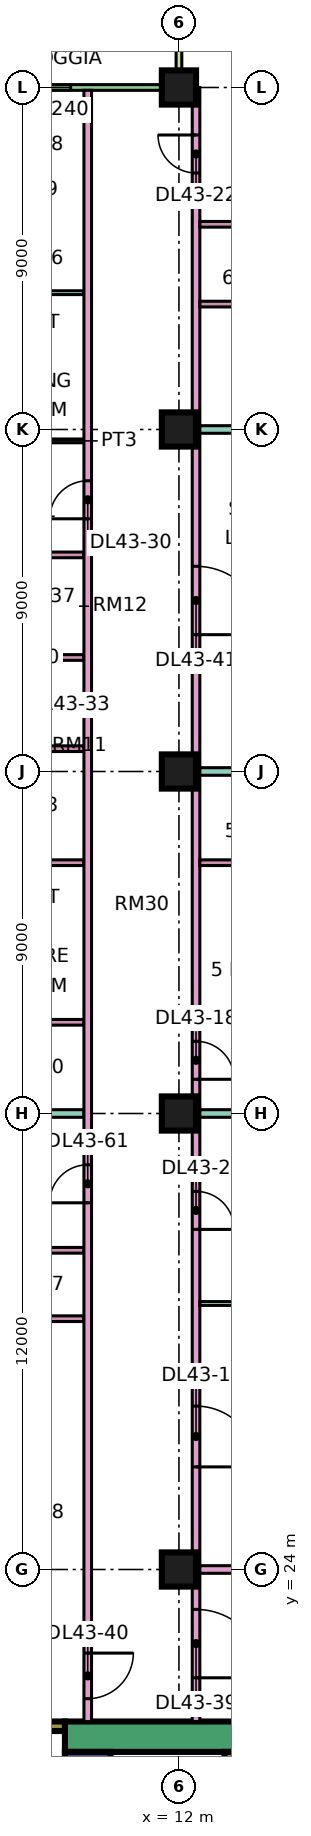
"""IFC4 building model, lengths in metres.
Left out: names, types, materials, properties, quantities, classifications, styles, units other than length and angle.
Written with IfcOpenShell. Run it as: python <this file> out.ifc"""

import sys

from ifc_helpers import new_model, si_unit, direction, frame, frame_2d, origin, origin_2d, place, context, subcontext, project, spatial, rectangle, extrude, element, fill, save


model = new_model("IFC4")
c1 = context("Model", 3, precision=1e-05, world=origin(), true_north=direction((0.0, 1.0)))
c2 = subcontext(c1, "Body", "Model", "MODEL_VIEW")
j1 = project(units=[si_unit("LENGTHUNIT", "METRE"), si_unit("PLANEANGLEUNIT", "RADIAN")], contexts=[c1])
p1 = place(None, origin())
s1 = spatial("IfcSite", under=j1, at=p1, CompositionType="ELEMENT")
p2 = place(p1, origin())
s2 = spatial("IfcBuilding", under=s1, at=p2, CompositionType="ELEMENT")
p3 = place(p2, frame((0.0, 0.0, 187.4)))
s3 = spatial("IfcBuildingStorey", under=s2, at=p3, CompositionType="ELEMENT", Elevation=187.4)
for number, where, z_axis, x_axis in (
    (1, (12.0, 24.0, 0.0), (0.0, 0.0, 1.0), (1.0, 0.0, 0.0)),
    (2, (12.0, 36.0, 0.0), (0.0, 0.0, 1.0), (1.0, 0.0, 0.0)),
    (3, (12.0, 45.0, 0.0), (0.0, 0.0, 1.0), (1.0, 0.0, 0.0)),
    (4, (12.0, 54.0, 0.0), (0.0, 0.0, 1.0), (1.0, 0.0, 0.0)),
    (5, (12.0, 63.0, 0.0), (0.0, 0.0, 1.0), (1.0, 0.0, 0.0)),
):
    element("IfcColumn", number, at=place(p3, frame(where, z_axis=z_axis, x_axis=x_axis)), inside=s3, PredefinedType="COLUMN", context=c2, shape_type="SweptSolid", body=[
        extrude(rectangle(XDim=0.9, YDim=0.9, at=origin_2d()), origin(), (0.0, 0.0, 1.0), 3.75),
    ])
p4 = place(p3, frame((9.0, 19.6, 0.0), z_axis=(0.0, 0.0, 1.0), x_axis=(1.0, 0.0, 0.0)))
e6 = element("IfcWall", 6, at=p4, inside=s3, PredefinedType="SHEAR", context=c2, shape_type="SweptSolid", body=[
    extrude(rectangle(XDim=25.0, YDim=0.8, at=frame_2d((12.5, 0.0))), origin(), (0.0, 0.0, 1.0), 3.75),
])
p5 = place(p4, frame((19.1, 0.0, 0.0)))
e7 = element("IfcOpeningElement", 7, at=p5, cuts=e6, PredefinedType="OPENING", context=c2, shape_type="SweptSolid", body=[
    extrude(rectangle(XDim=1.8, YDim=2.4, at=frame_2d((0.9, 1.2))), frame((0.0, 0.41, 0.0), z_axis=(0.0, -1.0, 0.0), x_axis=(1.0, 0.0, 0.0)), (0.0, 0.0, 1.0), 0.82),
])
p6 = place(p3, frame((9.6, 7.8, 0.0), z_axis=(0.0, 0.0, 1.0), x_axis=(0.0, 1.0, 0.0)))
e8 = element("IfcWall", 8, at=p6, inside=s3, PredefinedType="SHEAR", context=c2, shape_type="SweptSolid", body=[
    extrude(rectangle(XDim=11.4, YDim=1.2, at=frame_2d((5.7, 0.0))), origin(), (0.0, 0.0, 1.0), 3.75),
])
p7 = place(p6, frame((4.075, 0.0, 0.0)))
e9 = element("IfcOpeningElement", 9, at=p7, cuts=e8, PredefinedType="OPENING", context=c2, shape_type="SweptSolid", body=[
    extrude(rectangle(XDim=1.1, YDim=2.2, at=frame_2d((0.55, 1.1))), frame((0.0, 0.61, 0.0), z_axis=(0.0, -1.0, 0.0), x_axis=(1.0, 0.0, 0.0)), (0.0, 0.0, 1.0), 1.22),
])
p8 = place(p6, frame((6.575, 0.0, 0.0)))
e10 = element("IfcOpeningElement", 10, at=p8, cuts=e8, PredefinedType="OPENING", context=c2, shape_type="SweptSolid", body=[
    extrude(rectangle(XDim=1.1, YDim=2.2, at=frame_2d((0.55, 1.1))), frame((0.0, 0.61, 0.0), z_axis=(0.0, -1.0, 0.0), x_axis=(1.0, 0.0, 0.0)), (0.0, 0.0, 1.0), 1.22),
])
p9 = place(p6, frame((9.4, 0.0, 0.0)))
e11 = element("IfcOpeningElement", 11, at=p9, cuts=e8, PredefinedType="OPENING", context=c2, shape_type="SweptSolid", body=[
    extrude(rectangle(XDim=1.1, YDim=2.2, at=frame_2d((0.55, 1.1))), frame((0.0, 0.61, 0.0), z_axis=(0.0, -1.0, 0.0), x_axis=(1.0, 0.0, 0.0)), (0.0, 0.0, 1.0), 1.22),
])
p10 = place(p6, frame((1.75, 0.0, 0.0)))
e12 = element("IfcOpeningElement", 12, at=p10, cuts=e8, PredefinedType="OPENING", context=c2, shape_type="SweptSolid", body=[
    extrude(rectangle(XDim=0.9, YDim=2.1, at=frame_2d((0.45, 1.05))), frame((0.0, 0.61, 0.0), z_axis=(0.0, -1.0, 0.0), x_axis=(1.0, 0.0, 0.0)), (0.0, 0.0, 1.0), 1.22),
])
p11 = place(p3, frame((13.325, 7.8, 0.0), z_axis=(0.0, 0.0, 1.0), x_axis=(0.0, 1.0, 0.0)))
e13 = element("IfcWall", 13, at=p11, inside=s3, PredefinedType="SHEAR", context=c2, shape_type="SweptSolid", body=[
    extrude(rectangle(XDim=11.4, YDim=0.25, at=frame_2d((5.7, 0.0))), origin(), (0.0, 0.0, 1.0), 3.75),
])
p12 = place(p3, frame((2.1, 19.875, 0.0), z_axis=(0.0, 0.0, 1.0), x_axis=(1.0, 0.0, 0.0)))
e14 = element("IfcWall", 14, at=p12, inside=s3, PredefinedType="SHEAR", context=c2, shape_type="SweptSolid", body=[
    extrude(rectangle(XDim=6.9, YDim=0.25, at=frame_2d((3.45, 0.0))), origin(), (0.0, 0.0, 1.0), 3.75),
])
p13 = place(p12, frame((1.175, 0.0, 0.0)))
e15 = element("IfcOpeningElement", 15, at=p13, cuts=e14, PredefinedType="OPENING", context=c2, shape_type="SweptSolid", body=[
    extrude(rectangle(XDim=1.1, YDim=2.2, at=frame_2d((0.55, 1.1))), frame((0.0, 0.135, 0.0), z_axis=(0.0, -1.0, 0.0), x_axis=(1.0, 0.0, 0.0)), (0.0, 0.0, 1.0), 0.27),
])
p14 = place(p12, frame((4.6, 0.0, 0.0)))
e16 = element("IfcOpeningElement", 16, at=p14, cuts=e14, PredefinedType="OPENING", context=c2, shape_type="SweptSolid", body=[
    extrude(rectangle(XDim=1.2, YDim=2.2, at=frame_2d((0.6, 1.1))), frame((0.0, 0.135, 0.0), z_axis=(0.0, -1.0, 0.0), x_axis=(1.0, 0.0, 0.0)), (0.0, 0.0, 1.0), 0.27),
])
p15 = place(p3, frame((11.925, 63.0, 0.0), z_axis=(0.0, 0.0, 1.0), x_axis=(-1.0, 0.0, 0.0)))
e17 = element("IfcWall", 17, at=p15, inside=s3, PredefinedType="SOLIDWALL", context=c2, shape_type="SweptSolid", body=[
    extrude(rectangle(XDim=10.35, YDim=0.15, at=frame_2d((5.175, 0.0))), origin(), (0.0, 0.0, 1.0), 3.35),
])
p16 = place(p15, frame((2.775, 0.0, 0.45)))
e18 = element("IfcOpeningElement", 18, at=p16, cuts=e17, PredefinedType="OPENING", context=c2, shape_type="SweptSolid", body=[
    extrude(rectangle(XDim=1.8, YDim=2.4, at=frame_2d((0.9, 1.2))), frame((0.0, 0.085, 0.0), z_axis=(0.0, -1.0, 0.0), x_axis=(1.0, 0.0, 0.0)), (0.0, 0.0, 1.0), 0.17),
])
p17 = place(p15, frame((7.387, 0.0, 0.0)))
e19 = element("IfcOpeningElement", 19, at=p17, cuts=e17, PredefinedType="OPENING", context=c2, shape_type="SweptSolid", body=[
    extrude(rectangle(XDim=1.8, YDim=2.4, at=frame_2d((0.9, 1.2))), frame((0.0, 0.085, 0.0), z_axis=(0.0, -1.0, 0.0), x_axis=(1.0, 0.0, 0.0)), (0.0, 0.0, 1.0), 0.17),
])
p18 = place(p3, frame((12.0, 64.5, 0.0), z_axis=(0.0, 0.0, 1.0), x_axis=(0.0, -1.0, 0.0)))
e20 = element("IfcWall", 20, at=p18, inside=s3, PredefinedType="SOLIDWALL", context=c2, shape_type="SweptSolid", body=[
    extrude(rectangle(XDim=1.5, YDim=0.15, at=frame_2d((0.75, 0.0))), origin(), (0.0, 0.0, 1.0), 3.35),
])
p19 = place(p3, frame((-1.35, 22.4, 0.0), z_axis=(0.0, 0.0, 1.0), x_axis=(1.0, 0.0, 0.0)))
e21 = element("IfcWall", 21, at=p19, inside=s3, PredefinedType="PARTITIONING", context=c2, shape_type="SweptSolid", body=[
    extrude(rectangle(XDim=10.85, YDim=0.2, at=frame_2d((5.425, 0.0))), origin(), (0.0, 0.0, 1.0), 3.35),
])
p20 = place(p3, frame((0.0, 36.0, 0.0), z_axis=(0.0, 0.0, 1.0), x_axis=(1.0, 0.0, 0.0)))
e22 = element("IfcWall", 22, at=p20, inside=s3, PredefinedType="PARTITIONING", context=c2, shape_type="SweptSolid", body=[
    extrude(rectangle(XDim=9.5, YDim=0.2, at=frame_2d((4.75, 0.0))), origin(), (0.0, 0.0, 1.0), 3.35),
])
for number, where, z_axis, x_axis in (
    (23, (6.95, 53.7, 0.0), (0.0, 0.0, 1.0), (1.0, 0.0, 0.0)),
    (24, (6.95, 57.6, 0.0), (0.0, 0.0, 1.0), (1.0, 0.0, 0.0)),
):
    element("IfcWall", number, at=place(p3, frame(where, z_axis=z_axis, x_axis=x_axis)), inside=s3, PredefinedType="PARTITIONING", context=c2, shape_type="SweptSolid", body=[
        extrude(rectangle(XDim=2.55, YDim=0.1, at=frame_2d((1.275, 0.0))), origin(), (0.0, 0.0, 1.0), 3.35),
    ])
for number, where, z_axis, x_axis in (
    (25, (6.975, 30.6, 0.0), (0.0, 0.0, 1.0), (1.0, 0.0, 0.0)),
    (26, (6.975, 32.4, 0.0), (0.0, 0.0, 1.0), (1.0, 0.0, 0.0)),
    (27, (6.975, 38.4, 0.0), (0.0, 0.0, 1.0), (1.0, 0.0, 0.0)),
    (28, (6.975, 42.6, 0.0), (0.0, 0.0, 1.0), (1.0, 0.0, 0.0)),
    (29, (6.975, 45.6, 0.0), (0.0, 0.0, 1.0), (1.0, 0.0, 0.0)),
    (30, (6.975, 48.0, 0.0), (0.0, 0.0, 1.0), (1.0, 0.0, 0.0)),
):
    element("IfcWall", number, at=place(p3, frame(where, z_axis=z_axis, x_axis=x_axis)), inside=s3, PredefinedType="PARTITIONING", context=c2, shape_type="SweptSolid", body=[
        extrude(rectangle(XDim=2.525, YDim=0.15, at=frame_2d((1.262, 0.0))), origin(), (0.0, 0.0, 1.0), 3.35),
    ])
p21 = place(p3, frame((6.975, 50.7, 0.0), z_axis=(0.0, 0.0, 1.0), x_axis=(1.0, 0.0, 0.0)))
e31 = element("IfcWall", 31, at=p21, inside=s3, PredefinedType="PARTITIONING", context=c2, shape_type="SweptSolid", body=[
    extrude(rectangle(XDim=2.525, YDim=0.15, at=frame_2d((1.262, 0.0))), origin(), (0.0, 0.0, 1.0), 3.35),
])
p22 = place(p21, frame((0.825, 0.0, 0.0)))
e32 = element("IfcOpeningElement", 32, at=p22, cuts=e31, PredefinedType="OPENING", context=c2, shape_type="SweptSolid", body=[
    extrude(rectangle(XDim=0.8, YDim=2.1, at=frame_2d((0.4, 1.05))), frame((0.0, 0.085, 0.0), z_axis=(0.0, -1.0, 0.0), x_axis=(1.0, 0.0, 0.0)), (0.0, 0.0, 1.0), 0.17),
])
p23 = place(p3, frame((9.6, 20.0, 0.0), z_axis=(0.0, 0.0, 1.0), x_axis=(0.0, 1.0, 0.0)))
e33 = element("IfcWall", 33, at=p23, inside=s3, PredefinedType="PARTITIONING", context=c2, shape_type="SweptSolid", body=[
    extrude(rectangle(XDim=42.926, YDim=0.2, at=frame_2d((21.463, 0.0))), origin(), (0.0, 0.0, 1.0), 3.35),
])
p24 = place(p23, frame((31.65, 0.0, 0.0)))
e34 = element("IfcOpeningElement", 34, at=p24, cuts=e33, PredefinedType="OPENING", context=c2, shape_type="SweptSolid", body=[
    extrude(rectangle(XDim=1.0, YDim=2.1, at=frame_2d((0.5, 1.05))), frame((0.0, 0.11, 0.0), z_axis=(0.0, -1.0, 0.0), x_axis=(1.0, 0.0, 0.0)), (0.0, 0.0, 1.0), 0.22),
])
p25 = place(p23, frame((0.6, 0.0, 0.0)))
e35 = element("IfcOpeningElement", 35, at=p25, cuts=e33, PredefinedType="OPENING", context=c2, shape_type="SweptSolid", body=[
    extrude(rectangle(XDim=1.2, YDim=2.1, at=frame_2d((0.6, 1.05))), frame((0.0, 0.11, 0.0), z_axis=(0.0, -1.0, 0.0), x_axis=(1.0, 0.0, 0.0)), (0.0, 0.0, 1.0), 0.22),
])
p26 = place(p23, frame((13.65, 0.0, 0.0)))
e36 = element("IfcOpeningElement", 36, at=p26, cuts=e33, PredefinedType="OPENING", context=c2, shape_type="SweptSolid", body=[
    extrude(rectangle(XDim=1.0, YDim=2.1, at=frame_2d((0.5, 1.05))), frame((0.0, 0.11, 0.0), z_axis=(0.0, -1.0, 0.0), x_axis=(1.0, 0.0, 0.0)), (0.0, 0.0, 1.0), 0.22),
])
p27 = place(p3, frame((12.45, 20.0, 0.0), z_axis=(0.0, 0.0, 1.0), x_axis=(0.0, 1.0, 0.0)))
e37 = element("IfcWall", 37, at=p27, inside=s3, PredefinedType="PARTITIONING", context=c2, shape_type="SweptSolid", body=[
    extrude(rectangle(XDim=43.0, YDim=0.2, at=frame_2d((21.5, 0.0))), origin(), (0.0, 0.0, 1.0), 3.35),
])
p28 = place(p27, frame((6.7, 0.0, 0.0)))
e38 = element("IfcOpeningElement", 38, at=p28, cuts=e37, PredefinedType="OPENING", context=c2, shape_type="SweptSolid", body=[
    extrude(rectangle(XDim=1.6, YDim=2.1, at=frame_2d((0.8, 1.05))), frame((0.0, 0.11, 0.0), z_axis=(0.0, -1.0, 0.0), x_axis=(1.0, 0.0, 0.0)), (0.0, 0.0, 1.0), 0.22),
])
p29 = place(p27, frame((12.95, 0.0, 0.0)))
e39 = element("IfcOpeningElement", 39, at=p29, cuts=e37, PredefinedType="OPENING", context=c2, shape_type="SweptSolid", body=[
    extrude(rectangle(XDim=1.0, YDim=2.1, at=frame_2d((0.5, 1.05))), frame((0.0, 0.11, 0.0), z_axis=(0.0, -1.0, 0.0), x_axis=(1.0, 0.0, 0.0)), (0.0, 0.0, 1.0), 0.22),
])
p30 = place(p27, frame((16.9, 0.0, 0.0)))
e40 = element("IfcOpeningElement", 40, at=p30, cuts=e37, PredefinedType="OPENING", context=c2, shape_type="SweptSolid", body=[
    extrude(rectangle(XDim=1.0, YDim=2.1, at=frame_2d((0.5, 1.05))), frame((0.0, 0.11, 0.0), z_axis=(0.0, -1.0, 0.0), x_axis=(1.0, 0.0, 0.0)), (0.0, 0.0, 1.0), 0.22),
])
p31 = place(p27, frame((40.75, 0.0, 0.0)))
e41 = element("IfcOpeningElement", 41, at=p31, cuts=e37, PredefinedType="OPENING", context=c2, shape_type="SweptSolid", body=[
    extrude(rectangle(XDim=1.0, YDim=2.1, at=frame_2d((0.5, 1.05))), frame((0.0, 0.11, 0.0), z_axis=(0.0, -1.0, 0.0), x_axis=(1.0, 0.0, 0.0)), (0.0, 0.0, 1.0), 0.22),
])
p32 = place(p27, frame((1.15, 0.0, 0.0)))
e42 = element("IfcOpeningElement", 42, at=p32, cuts=e37, PredefinedType="OPENING", context=c2, shape_type="SweptSolid", body=[
    extrude(rectangle(XDim=1.8, YDim=2.1, at=frame_2d((0.9, 1.05))), frame((0.0, 0.11, 0.0), z_axis=(0.0, -1.0, 0.0), x_axis=(1.0, 0.0, 0.0)), (0.0, 0.0, 1.0), 0.22),
])
p33 = place(p27, frame((28.6, 0.0, 0.0)))
e43 = element("IfcOpeningElement", 43, at=p33, cuts=e37, PredefinedType="OPENING", context=c2, shape_type="SweptSolid", body=[
    extrude(rectangle(XDim=1.8, YDim=2.1, at=frame_2d((0.9, 1.05))), frame((0.0, 0.11, 0.0), z_axis=(0.0, -1.0, 0.0), x_axis=(1.0, 0.0, 0.0)), (0.0, 0.0, 1.0), 0.22),
])
p34 = place(p3, frame((12.55, 24.0, 0.0), z_axis=(0.0, 0.0, 1.0), x_axis=(1.0, 0.0, 0.0)))
e44 = element("IfcWall", 44, at=p34, inside=s3, PredefinedType="PARTITIONING", context=c2, shape_type="SweptSolid", body=[
    extrude(rectangle(XDim=8.95, YDim=0.2, at=frame_2d((4.475, 0.0))), origin(), (0.0, 0.0, 1.0), 3.35),
])
p35 = place(p3, frame((12.55, 31.0, 0.0), z_axis=(0.0, 0.0, 1.0), x_axis=(1.0, 0.0, 0.0)))
e45 = element("IfcWall", 45, at=p35, inside=s3, PredefinedType="PARTITIONING", context=c2, shape_type="SweptSolid", body=[
    extrude(rectangle(XDim=8.95, YDim=0.1, at=frame_2d((4.475, 0.0))), origin(), (0.0, 0.0, 1.0), 3.35),
])
p36 = place(p3, frame((12.55, 36.0, 0.0), z_axis=(0.0, 0.0, 1.0), x_axis=(1.0, 0.0, 0.0)))
e46 = element("IfcWall", 46, at=p36, inside=s3, PredefinedType="PARTITIONING", context=c2, shape_type="SweptSolid", body=[
    extrude(rectangle(XDim=11.45, YDim=0.2, at=frame_2d((5.725, 0.0))), origin(), (0.0, 0.0, 1.0), 3.35),
])
for number, where, z_axis, x_axis in (
    (47, (12.55, 38.7, 0.0), (0.0, 0.0, 1.0), (1.0, 0.0, 0.0)),
    (48, (12.55, 42.6, 0.0), (0.0, 0.0, 1.0), (1.0, 0.0, 0.0)),
):
    element("IfcWall", number, at=place(p3, frame(where, z_axis=z_axis, x_axis=x_axis)), inside=s3, PredefinedType="PARTITIONING", context=c2, shape_type="SweptSolid", body=[
        extrude(rectangle(XDim=4.025, YDim=0.15, at=frame_2d((2.012, 0.0))), origin(), (0.0, 0.0, 1.0), 3.35),
    ])
p37 = place(p3, frame((12.55, 45.0, 0.0), z_axis=(0.0, 0.0, 1.0), x_axis=(1.0, 0.0, 0.0)))
e49 = element("IfcWall", 49, at=p37, inside=s3, PredefinedType="PARTITIONING", context=c2, shape_type="SweptSolid", body=[
    extrude(rectangle(XDim=11.45, YDim=0.2, at=frame_2d((5.725, 0.0))), origin(), (0.0, 0.0, 1.0), 3.35),
])
p38 = place(p3, frame((12.55, 54.0, 0.0), z_axis=(0.0, 0.0, 1.0), x_axis=(1.0, 0.0, 0.0)))
e50 = element("IfcWall", 50, at=p38, inside=s3, PredefinedType="PARTITIONING", context=c2, shape_type="SweptSolid", body=[
    extrude(rectangle(XDim=11.376, YDim=0.2, at=frame_2d((5.688, 0.0))), origin(), (0.0, 0.0, 1.0), 3.35),
])
for number, where, z_axis, x_axis in (
    (51, (12.55, 57.3, 0.0), (0.0, 0.0, 1.0), (1.0, 0.0, 0.0)),
    (52, (12.55, 59.4, 0.0), (0.0, 0.0, 1.0), (1.0, 0.0, 0.0)),
):
    element("IfcWall", number, at=place(p3, frame(where, z_axis=z_axis, x_axis=x_axis)), inside=s3, PredefinedType="PARTITIONING", context=c2, shape_type="SweptSolid", body=[
        extrude(rectangle(XDim=4.625, YDim=0.15, at=frame_2d((2.312, 0.0))), origin(), (0.0, 0.0, 1.0), 3.35),
    ])
p39 = place(p16, origin())
e53 = element("IfcWindow", 53, at=p39, inside=s3, PartitioningType="SINGLE_PANEL", PredefinedType="WINDOW", context=c2, shape_type="SweptSolid", body=[
    extrude(rectangle(XDim=1.8, YDim=2.4, at=frame_2d((0.9, 1.2))), frame((0.0, 0.03, 0.0), z_axis=(0.0, -1.0, 0.0), x_axis=(1.0, 0.0, 0.0)), (0.0, 0.0, 1.0), 0.06),
])
fill(e18, e53)
p40 = place(p28, frame((1.6, 0.0, 0.0), z_axis=(0.0, 0.0, 1.0), x_axis=(-1.0, 0.0, 0.0)))
e54 = element("IfcDoor", 54, at=p40, inside=s3, OperationType="DOUBLE_DOOR_SINGLE_SWING", PredefinedType="DOOR", context=c2, shape_type="SweptSolid", body=[
    extrude(rectangle(XDim=1.6, YDim=2.1, at=frame_2d((0.8, 1.05))), frame((0.0, 0.025, 0.0), z_axis=(0.0, -1.0, 0.0), x_axis=(1.0, 0.0, 0.0)), (0.0, 0.0, 1.0), 0.05),
])
fill(e38, e54)
p41 = place(p29, frame((1.0, 0.0, 0.0), z_axis=(0.0, 0.0, 1.0), x_axis=(-1.0, 0.0, 0.0)))
e55 = element("IfcDoor", 55, at=p41, inside=s3, OperationType="SINGLE_SWING_LEFT", PredefinedType="DOOR", context=c2, shape_type="SweptSolid", body=[
    extrude(rectangle(XDim=1.0, YDim=2.1, at=frame_2d((0.5, 1.05))), frame((0.0, 0.025, 0.0), z_axis=(0.0, -1.0, 0.0), x_axis=(1.0, 0.0, 0.0)), (0.0, 0.0, 1.0), 0.05),
])
fill(e39, e55)
p42 = place(p30, frame((1.0, 0.0, 0.0), z_axis=(0.0, 0.0, 1.0), x_axis=(-1.0, 0.0, 0.0)))
e56 = element("IfcDoor", 56, at=p42, inside=s3, OperationType="SINGLE_SWING_LEFT", PredefinedType="DOOR", context=c2, shape_type="SweptSolid", body=[
    extrude(rectangle(XDim=1.0, YDim=2.1, at=frame_2d((0.5, 1.05))), frame((0.0, 0.025, 0.0), z_axis=(0.0, -1.0, 0.0), x_axis=(1.0, 0.0, 0.0)), (0.0, 0.0, 1.0), 0.05),
])
fill(e40, e56)
p43 = place(p31, frame((1.0, 0.0, 0.0), z_axis=(0.0, 0.0, 1.0), x_axis=(-1.0, 0.0, 0.0)))
e57 = element("IfcDoor", 57, at=p43, inside=s3, OperationType="SINGLE_SWING_RIGHT", PredefinedType="DOOR", context=c2, shape_type="SweptSolid", body=[
    extrude(rectangle(XDim=1.0, YDim=2.1, at=frame_2d((0.5, 1.05))), frame((0.0, 0.025, 0.0), z_axis=(0.0, -1.0, 0.0), x_axis=(1.0, 0.0, 0.0)), (0.0, 0.0, 1.0), 0.05),
])
fill(e41, e57)
p44 = place(p24, origin())
e58 = element("IfcDoor", 58, at=p44, inside=s3, OperationType="SINGLE_SWING_LEFT", PredefinedType="DOOR", context=c2, shape_type="SweptSolid", body=[
    extrude(rectangle(XDim=1.0, YDim=2.1, at=frame_2d((0.5, 1.05))), frame((0.0, 0.025, 0.0), z_axis=(0.0, -1.0, 0.0), x_axis=(1.0, 0.0, 0.0)), (0.0, 0.0, 1.0), 0.05),
])
fill(e34, e58)
p45 = place(p32, frame((1.8, 0.0, 0.0), z_axis=(0.0, 0.0, 1.0), x_axis=(-1.0, 0.0, 0.0)))
e59 = element("IfcDoor", 59, at=p45, inside=s3, OperationType="DOUBLE_DOOR_SINGLE_SWING", PredefinedType="DOOR", context=c2, shape_type="SweptSolid", body=[
    extrude(rectangle(XDim=1.8, YDim=2.1, at=frame_2d((0.9, 1.05))), frame((0.0, 0.025, 0.0), z_axis=(0.0, -1.0, 0.0), x_axis=(1.0, 0.0, 0.0)), (0.0, 0.0, 1.0), 0.05),
])
fill(e42, e59)
p46 = place(p25, origin())
e60 = element("IfcDoor", 60, at=p46, inside=s3, OperationType="SINGLE_SWING_RIGHT", PredefinedType="DOOR", context=c2, shape_type="SweptSolid", body=[
    extrude(rectangle(XDim=1.2, YDim=2.1, at=frame_2d((0.6, 1.05))), frame((0.0, 0.025, 0.0), z_axis=(0.0, -1.0, 0.0), x_axis=(1.0, 0.0, 0.0)), (0.0, 0.0, 1.0), 0.05),
])
fill(e35, e60)
p47 = place(p33, frame((1.8, 0.0, 0.0), z_axis=(0.0, 0.0, 1.0), x_axis=(-1.0, 0.0, 0.0)))
e61 = element("IfcDoor", 61, at=p47, inside=s3, OperationType="DOUBLE_DOOR_SINGLE_SWING", PredefinedType="DOOR", context=c2, shape_type="SweptSolid", body=[
    extrude(rectangle(XDim=1.8, YDim=2.1, at=frame_2d((0.9, 1.05))), frame((0.0, 0.025, 0.0), z_axis=(0.0, -1.0, 0.0), x_axis=(1.0, 0.0, 0.0)), (0.0, 0.0, 1.0), 0.05),
])
fill(e43, e61)
p48 = place(p26, origin())
e62 = element("IfcDoor", 62, at=p48, inside=s3, OperationType="SINGLE_SWING_LEFT", PredefinedType="DOOR", context=c2, shape_type="SweptSolid", body=[
    extrude(rectangle(XDim=1.0, YDim=2.1, at=frame_2d((0.5, 1.05))), frame((0.0, 0.025, 0.0), z_axis=(0.0, -1.0, 0.0), x_axis=(1.0, 0.0, 0.0)), (0.0, 0.0, 1.0), 0.05),
])
fill(e36, e62)
save(model, sys.argv[1])
